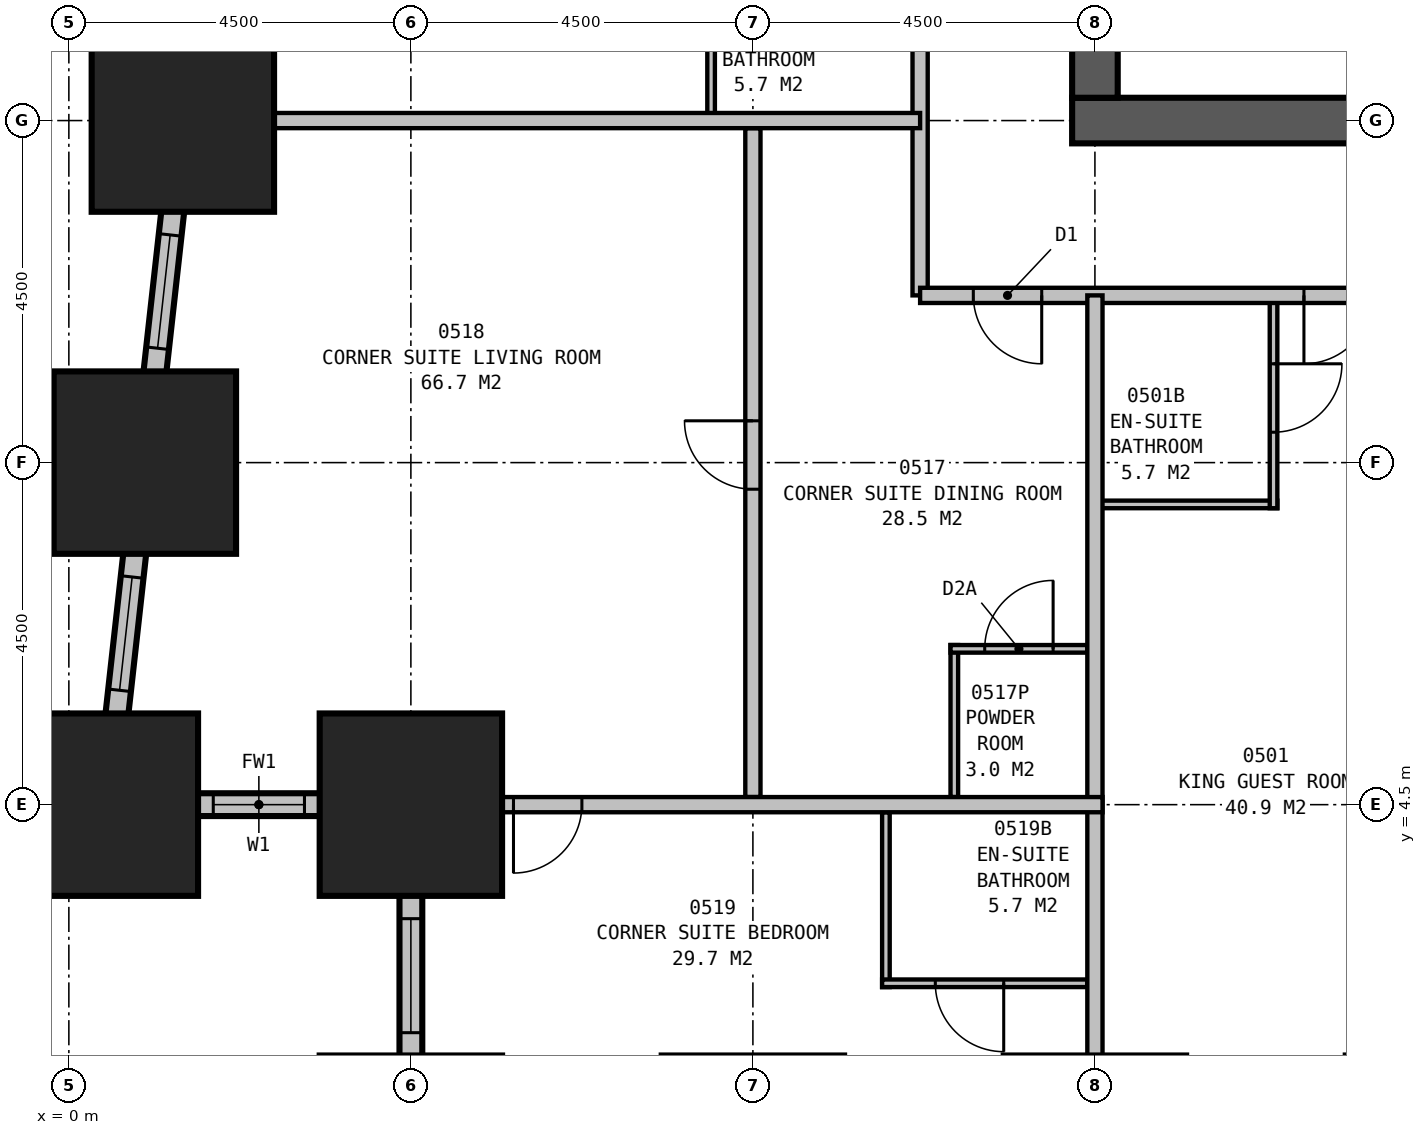
"""IFC4 building model, lengths in metres.
Left out: names, types, materials, properties, quantities, classifications, styles, units other than length and angle.
Written with IfcOpenShell. Run it as: python <this file> out.ifc"""

import sys

from ifc_helpers import new_model, si_unit, direction, frame, frame_2d, origin, origin_2d, place, context, subcontext, project, spatial, rectangle, extrude, element, fill, save


model = new_model("IFC4")
c1 = context("Model", 3, precision=1e-05, world=origin(), true_north=direction((0.0, 1.0)))
c2 = subcontext(c1, "Body", "Model", "MODEL_VIEW")
j1 = project(units=[si_unit("LENGTHUNIT", "METRE"), si_unit("PLANEANGLEUNIT", "RADIAN")], contexts=[c1])
p1 = place(None, origin())
s1 = spatial("IfcSite", under=j1, at=p1, CompositionType="ELEMENT")
p2 = place(p1, origin())
s2 = spatial("IfcBuilding", under=s1, at=p2, CompositionType="ELEMENT")
p3 = place(p2, frame((0.0, 0.0, 29.7)))
s3 = spatial("IfcBuildingStorey", under=s2, at=p3, CompositionType="ELEMENT", Elevation=29.7)
for number, where, z_axis, x_axis in (
    (1, (0.5, 4.5, 0.0), (0.0, 0.0, 1.0), (1.0, 0.0, 0.0)),
    (2, (4.5, 4.5, 0.0), (0.0, 0.0, 1.0), (1.0, 0.0, 0.0)),
    (3, (1.5, 13.5, 0.0), (0.0, 0.0, 1.0), (1.0, 0.0, 0.0)),
    (4, (1.0, 9.0, 0.0), (0.0, 0.0, 1.0), (1.0, 0.0, 0.0)),
):
    element("IfcColumn", number, at=place(p3, frame(where, z_axis=z_axis, x_axis=x_axis)), inside=s3, PredefinedType="COLUMN", context=c2, shape_type="SweptSolid", body=[
        extrude(rectangle(XDim=2.4, YDim=2.4, at=origin_2d()), origin(), (0.0, 0.0, 1.0), 3.5),
    ])
p4 = place(p3, frame((13.2, 13.5, 0.0), z_axis=(0.0, 0.0, 1.0), x_axis=(1.0, 0.0, 0.0)))
e5 = element("IfcWall", 5, at=p4, inside=s3, PredefinedType="SHEAR", context=c2, shape_type="SweptSolid", body=[
    extrude(rectangle(XDim=23.1, YDim=0.6, at=frame_2d((11.55, 0.0))), origin(), (0.0, 0.0, 1.0), 3.5),
])
p5 = place(p3, frame((13.5, 16.5, 0.0), z_axis=(0.0, 0.0, 1.0), x_axis=(0.0, -1.0, 0.0)))
e6 = element("IfcWall", 6, at=p5, inside=s3, PredefinedType="SHEAR", context=c2, shape_type="SweptSolid", body=[
    extrude(rectangle(XDim=2.7, YDim=0.6, at=frame_2d((1.35, 0.0))), origin(), (0.0, 0.0, 1.0), 3.5),
])
p6 = place(p3, frame((0.35, 4.5, 0.0), z_axis=(0.0, 0.0, 1.0), x_axis=(1.0, 0.0, 0.0)))
e7 = element("IfcWall", 7, at=p6, inside=s3, PredefinedType="STANDARD", context=c2, shape_type="SweptSolid", body=[
    extrude(rectangle(XDim=4.3, YDim=0.3, at=frame_2d((2.15, 0.0))), origin(), (0.0, 0.0, 1.0), 2.05),
])
p7 = place(p6, frame((1.55, 0.0, 0.5)))
e8 = element("IfcOpeningElement", 8, at=p7, cuts=e7, PredefinedType="OPENING", context=c2, shape_type="SweptSolid", body=[
    extrude(rectangle(XDim=1.2, YDim=1.4, at=frame_2d((0.6, 0.7))), frame((0.0, 0.16, 0.0), z_axis=(0.0, -1.0, 0.0), x_axis=(1.0, 0.0, 0.0)), (0.0, 0.0, 1.0), 0.32),
])
p8 = place(p3, frame((4.5, 4.65, 0.0), z_axis=(0.0, 0.0, 1.0), x_axis=(0.0, -1.0, 0.0)))
e9 = element("IfcWall", 9, at=p8, inside=s3, PredefinedType="STANDARD", context=c2, shape_type="SweptSolid", body=[
    extrude(rectangle(XDim=4.8, YDim=0.3, at=frame_2d((2.4, 0.0))), origin(), (0.0, 0.0, 1.0), 2.05),
])
p9 = place(p8, frame((1.65, 0.0, 0.5)))
e10 = element("IfcOpeningElement", 10, at=p9, cuts=e9, PredefinedType="OPENING", context=c2, shape_type="SweptSolid", body=[
    extrude(rectangle(XDim=1.5, YDim=1.4, at=frame_2d((0.75, 0.7))), frame((0.0, 0.16, 0.0), z_axis=(0.0, -1.0, 0.0), x_axis=(1.0, 0.0, 0.0)), (0.0, 0.0, 1.0), 0.32),
])
p10 = place(p3, frame((4.017, 36.149, 0.0), z_axis=(0.0, 0.0, 1.0), x_axis=(-0.110433201132, -0.993883548555, 0.0)))
e11 = element("IfcWall", 11, at=p10, inside=s3, PredefinedType="STANDARD", context=c2, shape_type="SweptSolid", body=[
    extrude(rectangle(XDim=31.994, YDim=0.3, at=frame_2d((15.997, 0.0))), origin(), (0.0, 0.0, 1.0), 2.05),
])
p11 = place(p10, frame((1.664, 0.0, 0.5)))
e12 = element("IfcOpeningElement", 12, at=p11, cuts=e11, PredefinedType="OPENING", context=c2, shape_type="SweptSolid", body=[
    extrude(rectangle(XDim=1.5, YDim=1.4, at=frame_2d((0.75, 0.7))), frame((0.0, 0.16, 0.0), z_axis=(0.0, -1.0, 0.0), x_axis=(1.0, 0.0, 0.0)), (0.0, 0.0, 1.0), 0.32),
])
p12 = place(p10, frame((6.192, 0.0, 0.5)))
e13 = element("IfcOpeningElement", 13, at=p12, cuts=e11, PredefinedType="OPENING", context=c2, shape_type="SweptSolid", body=[
    extrude(rectangle(XDim=1.5, YDim=1.4, at=frame_2d((0.75, 0.7))), frame((0.0, 0.16, 0.0), z_axis=(0.0, -1.0, 0.0), x_axis=(1.0, 0.0, 0.0)), (0.0, 0.0, 1.0), 0.32),
])
p13 = place(p10, frame((10.719, 0.0, 0.5)))
e14 = element("IfcOpeningElement", 14, at=p13, cuts=e11, PredefinedType="OPENING", context=c2, shape_type="SweptSolid", body=[
    extrude(rectangle(XDim=1.5, YDim=1.4, at=frame_2d((0.75, 0.7))), frame((0.0, 0.16, 0.0), z_axis=(0.0, -1.0, 0.0), x_axis=(1.0, 0.0, 0.0)), (0.0, 0.0, 1.0), 0.32),
])
p14 = place(p10, frame((15.247, 0.0, 0.5)))
e15 = element("IfcOpeningElement", 15, at=p14, cuts=e11, PredefinedType="OPENING", context=c2, shape_type="SweptSolid", body=[
    extrude(rectangle(XDim=1.5, YDim=1.4, at=frame_2d((0.75, 0.7))), frame((0.0, 0.16, 0.0), z_axis=(0.0, -1.0, 0.0), x_axis=(1.0, 0.0, 0.0)), (0.0, 0.0, 1.0), 0.32),
])
p15 = place(p10, frame((19.775, 0.0, 0.5)))
e16 = element("IfcOpeningElement", 16, at=p15, cuts=e11, PredefinedType="OPENING", context=c2, shape_type="SweptSolid", body=[
    extrude(rectangle(XDim=1.5, YDim=1.4, at=frame_2d((0.75, 0.7))), frame((0.0, 0.16, 0.0), z_axis=(0.0, -1.0, 0.0), x_axis=(1.0, 0.0, 0.0)), (0.0, 0.0, 1.0), 0.32),
])
p16 = place(p10, frame((24.302, 0.0, 0.5)))
e17 = element("IfcOpeningElement", 17, at=p16, cuts=e11, PredefinedType="OPENING", context=c2, shape_type="SweptSolid", body=[
    extrude(rectangle(XDim=1.5, YDim=1.4, at=frame_2d((0.75, 0.7))), frame((0.0, 0.16, 0.0), z_axis=(0.0, -1.0, 0.0), x_axis=(1.0, 0.0, 0.0)), (0.0, 0.0, 1.0), 0.32),
])
p17 = place(p10, frame((28.83, 0.0, 0.5)))
e18 = element("IfcOpeningElement", 18, at=p17, cuts=e11, PredefinedType="OPENING", context=c2, shape_type="SweptSolid", body=[
    extrude(rectangle(XDim=1.5, YDim=1.4, at=frame_2d((0.75, 0.7))), frame((0.0, 0.16, 0.0), z_axis=(0.0, -1.0, 0.0), x_axis=(1.0, 0.0, 0.0)), (0.0, 0.0, 1.0), 0.32),
])
p18 = place(p3, frame((11.2, 11.2, 0.0), z_axis=(0.0, 0.0, 1.0), x_axis=(1.0, 0.0, 0.0)))
e19 = element("IfcWall", 19, at=p18, inside=s3, PredefinedType="PARTITIONING", context=c2, shape_type="SweptSolid", body=[
    extrude(rectangle(XDim=27.1, YDim=0.2, at=frame_2d((13.55, 0.0))), origin(), (0.0, 0.0, 1.0), 3.25),
])
p19 = place(p18, frame((5.95, 0.0, 0.0), z_axis=(0.0, 0.0, 1.0), x_axis=(-1.0, 0.0, 0.0)))
e20 = element("IfcOpeningElement", 20, at=p19, cuts=e19, PredefinedType="OPENING", context=c2, shape_type="SweptSolid", body=[
    extrude(rectangle(XDim=0.9, YDim=2.1, at=frame_2d((0.45, 1.05))), frame((0.0, 0.11, 0.0), z_axis=(0.0, -1.0, 0.0), x_axis=(1.0, 0.0, 0.0)), (0.0, 0.0, 1.0), 0.22),
])
p20 = place(p18, frame((10.95, 0.0, 0.0), z_axis=(0.0, 0.0, 1.0), x_axis=(-1.0, 0.0, 0.0)))
e21 = element("IfcOpeningElement", 21, at=p20, cuts=e19, PredefinedType="OPENING", context=c2, shape_type="SweptSolid", body=[
    extrude(rectangle(XDim=1.0, YDim=2.1, at=frame_2d((0.5, 1.05))), frame((0.0, 0.11, 0.0), z_axis=(0.0, -1.0, 0.0), x_axis=(1.0, 0.0, 0.0)), (0.0, 0.0, 1.0), 0.22),
])
p21 = place(p18, frame((14.95, 0.0, 0.0), z_axis=(0.0, 0.0, 1.0), x_axis=(-1.0, 0.0, 0.0)))
e22 = element("IfcOpeningElement", 22, at=p21, cuts=e19, PredefinedType="OPENING", context=c2, shape_type="SweptSolid", body=[
    extrude(rectangle(XDim=0.9, YDim=2.1, at=frame_2d((0.45, 1.05))), frame((0.0, 0.11, 0.0), z_axis=(0.0, -1.0, 0.0), x_axis=(1.0, 0.0, 0.0)), (0.0, 0.0, 1.0), 0.22),
])
p22 = place(p18, frame((19.45, 0.0, 0.0), z_axis=(0.0, 0.0, 1.0), x_axis=(-1.0, 0.0, 0.0)))
e23 = element("IfcOpeningElement", 23, at=p22, cuts=e19, PredefinedType="OPENING", context=c2, shape_type="SweptSolid", body=[
    extrude(rectangle(XDim=0.9, YDim=2.1, at=frame_2d((0.45, 1.05))), frame((0.0, 0.11, 0.0), z_axis=(0.0, -1.0, 0.0), x_axis=(1.0, 0.0, 0.0)), (0.0, 0.0, 1.0), 0.22),
])
p23 = place(p18, frame((23.95, 0.0, 0.0), z_axis=(0.0, 0.0, 1.0), x_axis=(-1.0, 0.0, 0.0)))
e24 = element("IfcOpeningElement", 24, at=p23, cuts=e19, PredefinedType="OPENING", context=c2, shape_type="SweptSolid", body=[
    extrude(rectangle(XDim=0.9, YDim=2.1, at=frame_2d((0.45, 1.05))), frame((0.0, 0.11, 0.0), z_axis=(0.0, -1.0, 0.0), x_axis=(1.0, 0.0, 0.0)), (0.0, 0.0, 1.0), 0.22),
])
p24 = place(p18, frame((1.6, 0.0, 0.0), z_axis=(0.0, 0.0, 1.0), x_axis=(-1.0, 0.0, 0.0)))
e25 = element("IfcOpeningElement", 25, at=p24, cuts=e19, PredefinedType="OPENING", context=c2, shape_type="SweptSolid", body=[
    extrude(rectangle(XDim=0.9, YDim=2.1, at=frame_2d((0.45, 1.05))), frame((0.0, 0.11, 0.0), z_axis=(0.0, -1.0, 0.0), x_axis=(1.0, 0.0, 0.0)), (0.0, 0.0, 1.0), 0.22),
])
p25 = place(p18, frame((26.4, 0.0, 0.0), z_axis=(0.0, 0.0, 1.0), x_axis=(-1.0, 0.0, 0.0)))
e26 = element("IfcOpeningElement", 26, at=p25, cuts=e19, PredefinedType="OPENING", context=c2, shape_type="SweptSolid", body=[
    extrude(rectangle(XDim=0.9, YDim=2.1, at=frame_2d((0.45, 1.05))), frame((0.0, 0.11, 0.0), z_axis=(0.0, -1.0, 0.0), x_axis=(1.0, 0.0, 0.0)), (0.0, 0.0, 1.0), 0.22),
])
p26 = place(p3, frame((11.2, 11.2, 0.0), z_axis=(0.0, 0.0, 1.0), x_axis=(0.0, 1.0, 0.0)))
e27 = element("IfcWall", 27, at=p26, inside=s3, PredefinedType="PARTITIONING", context=c2, shape_type="SweptSolid", body=[
    extrude(rectangle(XDim=18.1, YDim=0.2, at=frame_2d((9.05, 0.0))), origin(), (0.0, 0.0, 1.0), 3.25),
])
p27 = place(p26, frame((5.05, 0.0, 0.0)))
e28 = element("IfcOpeningElement", 28, at=p27, cuts=e27, PredefinedType="OPENING", context=c2, shape_type="SweptSolid", body=[
    extrude(rectangle(XDim=0.9, YDim=2.1, at=frame_2d((0.45, 1.05))), frame((0.0, 0.11, 0.0), z_axis=(0.0, -1.0, 0.0), x_axis=(1.0, 0.0, 0.0)), (0.0, 0.0, 1.0), 0.22),
])
p28 = place(p26, frame((9.55, 0.0, 0.0)))
e29 = element("IfcOpeningElement", 29, at=p28, cuts=e27, PredefinedType="OPENING", context=c2, shape_type="SweptSolid", body=[
    extrude(rectangle(XDim=0.9, YDim=2.1, at=frame_2d((0.45, 1.05))), frame((0.0, 0.11, 0.0), z_axis=(0.0, -1.0, 0.0), x_axis=(1.0, 0.0, 0.0)), (0.0, 0.0, 1.0), 0.22),
])
p29 = place(p26, frame((12.0, 0.0, 0.0)))
e30 = element("IfcOpeningElement", 30, at=p29, cuts=e27, PredefinedType="OPENING", context=c2, shape_type="SweptSolid", body=[
    extrude(rectangle(XDim=1.0, YDim=2.1, at=frame_2d((0.5, 1.05))), frame((0.0, 0.11, 0.0), z_axis=(0.0, -1.0, 0.0), x_axis=(1.0, 0.0, 0.0)), (0.0, 0.0, 1.0), 0.22),
])
p30 = place(p3, frame((13.5, 8.45, 0.0), z_axis=(0.0, 0.0, 1.0), x_axis=(1.0, 0.0, 0.0)))
e31 = element("IfcWall", 31, at=p30, inside=s3, PredefinedType="PLUMBINGWALL", context=c2, shape_type="SweptSolid", body=[
    extrude(rectangle(XDim=2.4, YDim=0.1, at=frame_2d((1.2, 0.0))), origin(), (0.0, 0.0, 1.0), 3.25),
])
p31 = place(p3, frame((15.85, 11.2, 0.0), z_axis=(0.0, 0.0, 1.0), x_axis=(0.0, -1.0, 0.0)))
e32 = element("IfcWall", 32, at=p31, inside=s3, PredefinedType="PLUMBINGWALL", context=c2, shape_type="SweptSolid", body=[
    extrude(rectangle(XDim=2.8, YDim=0.1, at=frame_2d((1.4, 0.0))), origin(), (0.0, 0.0, 1.0), 3.25),
])
p32 = place(p31, frame((0.9, 0.0, 0.0)))
e33 = element("IfcOpeningElement", 33, at=p32, cuts=e32, PredefinedType="OPENING", context=c2, shape_type="SweptSolid", body=[
    extrude(rectangle(XDim=0.9, YDim=2.1, at=frame_2d((0.45, 1.05))), frame((0.0, 0.06, 0.0), z_axis=(0.0, -1.0, 0.0), x_axis=(1.0, 0.0, 0.0)), (0.0, 0.0, 1.0), 0.12),
])
p33 = place(p3, frame((8.45, 13.5, 0.0), z_axis=(0.0, 0.0, 1.0), x_axis=(0.0, 1.0, 0.0)))
e34 = element("IfcWall", 34, at=p33, inside=s3, PredefinedType="PLUMBINGWALL", context=c2, shape_type="SweptSolid", body=[
    extrude(rectangle(XDim=2.4, YDim=0.1, at=frame_2d((1.2, 0.0))), origin(), (0.0, 0.0, 1.0), 3.25),
])
p34 = place(p3, frame((11.2, 13.5, 0.0), z_axis=(0.0, 0.0, 1.0), x_axis=(-1.0, 0.0, 0.0)))
e35 = element("IfcWall", 35, at=p34, inside=s3, PredefinedType="PARTITIONING", context=c2, shape_type="SweptSolid", body=[
    extrude(rectangle(XDim=9.921, YDim=0.2, at=frame_2d((4.96, 0.0))), origin(), (0.0, 0.0, 1.0), 1.95),
])
p35 = place(p3, frame((13.5, 11.2, 0.0), z_axis=(0.0, 0.0, 1.0), x_axis=(0.0, -1.0, 0.0)))
e36 = element("IfcWall", 36, at=p35, inside=s3, PredefinedType="PARTITIONING", context=c2, shape_type="SweptSolid", body=[
    extrude(rectangle(XDim=11.2, YDim=0.2, at=frame_2d((5.6, 0.0))), origin(), (0.0, 0.0, 1.0), 2.25),
])
p36 = place(p3, frame((13.6, 4.5, 0.0), z_axis=(0.0, 0.0, 1.0), x_axis=(-1.0, 0.0, 0.0)))
e37 = element("IfcWall", 37, at=p36, inside=s3, PredefinedType="PARTITIONING", context=c2, shape_type="SweptSolid", body=[
    extrude(rectangle(XDim=9.1, YDim=0.2, at=frame_2d((4.55, 0.0))), origin(), (0.0, 0.0, 1.0), 3.25),
])
p37 = place(p36, frame((6.85, 0.0, 0.0)))
e38 = element("IfcOpeningElement", 38, at=p37, cuts=e37, PredefinedType="OPENING", context=c2, shape_type="SweptSolid", body=[
    extrude(rectangle(XDim=0.9, YDim=2.1, at=frame_2d((0.45, 1.05))), frame((0.0, 0.11, 0.0), z_axis=(0.0, -1.0, 0.0), x_axis=(1.0, 0.0, 0.0)), (0.0, 0.0, 1.0), 0.22),
])
p38 = place(p3, frame((9.0, 4.6, 0.0), z_axis=(0.0, 0.0, 1.0), x_axis=(0.0, 1.0, 0.0)))
e39 = element("IfcWall", 39, at=p38, inside=s3, PredefinedType="PARTITIONING", context=c2, shape_type="SweptSolid", body=[
    extrude(rectangle(XDim=8.8, YDim=0.2, at=frame_2d((4.4, 0.0))), origin(), (0.0, 0.0, 1.0), 2.25),
])
p39 = place(p38, frame((4.05, 0.0, 0.0)))
e40 = element("IfcOpeningElement", 40, at=p39, cuts=e39, PredefinedType="OPENING", context=c2, shape_type="SweptSolid", body=[
    extrude(rectangle(XDim=0.9, YDim=2.1, at=frame_2d((0.45, 1.05))), frame((0.0, 0.11, 0.0), z_axis=(0.0, -1.0, 0.0), x_axis=(1.0, 0.0, 0.0)), (0.0, 0.0, 1.0), 0.22),
])
p40 = place(p3, frame((11.65, 4.6, 0.0), z_axis=(0.0, 0.0, 1.0), x_axis=(0.0, 1.0, 0.0)))
e41 = element("IfcWall", 41, at=p40, inside=s3, PredefinedType="PLUMBINGWALL", context=c2, shape_type="SweptSolid", body=[
    extrude(rectangle(XDim=2.0, YDim=0.1, at=frame_2d((1.0, 0.0))), origin(), (0.0, 0.0, 1.0), 3.25),
])
p41 = place(p3, frame((13.4, 6.55, 0.0), z_axis=(0.0, 0.0, 1.0), x_axis=(-1.0, 0.0, 0.0)))
e42 = element("IfcWall", 42, at=p41, inside=s3, PredefinedType="PLUMBINGWALL", context=c2, shape_type="SweptSolid", body=[
    extrude(rectangle(XDim=1.8, YDim=0.1, at=frame_2d((0.9, 0.0))), origin(), (0.0, 0.0, 1.0), 3.25),
])
p42 = place(p41, frame((1.35, 0.0, 0.0), z_axis=(0.0, 0.0, 1.0), x_axis=(-1.0, 0.0, 0.0)))
e43 = element("IfcOpeningElement", 43, at=p42, cuts=e42, PredefinedType="OPENING", context=c2, shape_type="SweptSolid", body=[
    extrude(rectangle(XDim=0.9, YDim=2.1, at=frame_2d((0.45, 1.05))), frame((0.0, 0.06, 0.0), z_axis=(0.0, -1.0, 0.0), x_axis=(1.0, 0.0, 0.0)), (0.0, 0.0, 1.0), 0.12),
])
p43 = place(p3, frame((10.75, 4.4, 0.0), z_axis=(0.0, 0.0, 1.0), x_axis=(0.0, -1.0, 0.0)))
e44 = element("IfcWall", 44, at=p43, inside=s3, PredefinedType="PLUMBINGWALL", context=c2, shape_type="SweptSolid", body=[
    extrude(rectangle(XDim=2.3, YDim=0.1, at=frame_2d((1.15, 0.0))), origin(), (0.0, 0.0, 1.0), 3.25),
])
p44 = place(p3, frame((13.4, 2.15, 0.0), z_axis=(0.0, 0.0, 1.0), x_axis=(-1.0, 0.0, 0.0)))
e45 = element("IfcWall", 45, at=p44, inside=s3, PredefinedType="PLUMBINGWALL", context=c2, shape_type="SweptSolid", body=[
    extrude(rectangle(XDim=2.7, YDim=0.1, at=frame_2d((1.35, 0.0))), origin(), (0.0, 0.0, 1.0), 3.25),
])
p45 = place(p44, frame((1.1, 0.0, 0.0)))
e46 = element("IfcOpeningElement", 46, at=p45, cuts=e45, PredefinedType="OPENING", context=c2, shape_type="SweptSolid", body=[
    extrude(rectangle(XDim=0.9, YDim=2.1, at=frame_2d((0.45, 1.05))), frame((0.0, 0.06, 0.0), z_axis=(0.0, -1.0, 0.0), x_axis=(1.0, 0.0, 0.0)), (0.0, 0.0, 1.0), 0.12),
])
p46 = place(p7, origin())
e47 = element("IfcWindow", 47, at=p46, inside=s3, PartitioningType="SINGLE_PANEL", PredefinedType="WINDOW", context=c2, shape_type="SweptSolid", body=[
    extrude(rectangle(XDim=1.2, YDim=1.4, at=frame_2d((0.6, 0.7))), frame((0.0, 0.03, 0.0), z_axis=(0.0, -1.0, 0.0), x_axis=(1.0, 0.0, 0.0)), (0.0, 0.0, 1.0), 0.06),
])
fill(e8, e47)
p47 = place(p9, origin())
e48 = element("IfcWindow", 48, at=p47, inside=s3, PartitioningType="SINGLE_PANEL", PredefinedType="WINDOW", context=c2, shape_type="SweptSolid", body=[
    extrude(rectangle(XDim=1.5, YDim=1.4, at=frame_2d((0.75, 0.7))), frame((0.0, 0.03, 0.0), z_axis=(0.0, -1.0, 0.0), x_axis=(1.0, 0.0, 0.0)), (0.0, 0.0, 1.0), 0.06),
])
fill(e10, e48)
p48 = place(p16, origin())
e49 = element("IfcWindow", 49, at=p48, inside=s3, PartitioningType="SINGLE_PANEL", PredefinedType="WINDOW", context=c2, shape_type="SweptSolid", body=[
    extrude(rectangle(XDim=1.5, YDim=1.4, at=frame_2d((0.75, 0.7))), frame((0.0, 0.03, 0.0), z_axis=(0.0, -1.0, 0.0), x_axis=(1.0, 0.0, 0.0)), (0.0, 0.0, 1.0), 0.06),
])
fill(e17, e49)
p49 = place(p17, origin())
e50 = element("IfcWindow", 50, at=p49, inside=s3, PartitioningType="SINGLE_PANEL", PredefinedType="WINDOW", context=c2, shape_type="SweptSolid", body=[
    extrude(rectangle(XDim=1.5, YDim=1.4, at=frame_2d((0.75, 0.7))), frame((0.0, 0.03, 0.0), z_axis=(0.0, -1.0, 0.0), x_axis=(1.0, 0.0, 0.0)), (0.0, 0.0, 1.0), 0.06),
])
fill(e18, e50)
p50 = place(p19, origin())
e51 = element("IfcDoor", 51, at=p50, inside=s3, OperationType="SINGLE_SWING_RIGHT", PredefinedType="DOOR", context=c2, shape_type="SweptSolid", body=[
    extrude(rectangle(XDim=0.9, YDim=2.1, at=frame_2d((0.45, 1.05))), frame((0.0, 0.025, 0.0), z_axis=(0.0, -1.0, 0.0), x_axis=(1.0, 0.0, 0.0)), (0.0, 0.0, 1.0), 0.05),
])
fill(e20, e51)
p51 = place(p24, origin())
e52 = element("IfcDoor", 52, at=p51, inside=s3, OperationType="SINGLE_SWING_LEFT", PredefinedType="DOOR", context=c2, shape_type="SweptSolid", body=[
    extrude(rectangle(XDim=0.9, YDim=2.1, at=frame_2d((0.45, 1.05))), frame((0.0, 0.025, 0.0), z_axis=(0.0, -1.0, 0.0), x_axis=(1.0, 0.0, 0.0)), (0.0, 0.0, 1.0), 0.05),
])
fill(e25, e52)
p52 = place(p32, origin())
e53 = element("IfcDoor", 53, at=p52, inside=s3, OperationType="SINGLE_SWING_LEFT", PredefinedType="DOOR", context=c2, shape_type="SweptSolid", body=[
    extrude(rectangle(XDim=0.9, YDim=2.1, at=frame_2d((0.45, 1.05))), frame((0.0, 0.025, 0.0), z_axis=(0.0, -1.0, 0.0), x_axis=(1.0, 0.0, 0.0)), (0.0, 0.0, 1.0), 0.05),
])
fill(e33, e53)
p53 = place(p37, origin())
e54 = element("IfcDoor", 54, at=p53, inside=s3, OperationType="SINGLE_SWING_RIGHT", PredefinedType="DOOR", context=c2, shape_type="SweptSolid", body=[
    extrude(rectangle(XDim=0.9, YDim=2.1, at=frame_2d((0.45, 1.05))), frame((0.0, 0.025, 0.0), z_axis=(0.0, -1.0, 0.0), x_axis=(1.0, 0.0, 0.0)), (0.0, 0.0, 1.0), 0.05),
])
fill(e38, e54)
p54 = place(p39, origin())
e55 = element("IfcDoor", 55, at=p54, inside=s3, OperationType="SINGLE_SWING_RIGHT", PredefinedType="DOOR", context=c2, shape_type="SweptSolid", body=[
    extrude(rectangle(XDim=0.9, YDim=2.1, at=frame_2d((0.45, 1.05))), frame((0.0, 0.025, 0.0), z_axis=(0.0, -1.0, 0.0), x_axis=(1.0, 0.0, 0.0)), (0.0, 0.0, 1.0), 0.05),
])
fill(e40, e55)
p55 = place(p42, origin())
e56 = element("IfcDoor", 56, at=p55, inside=s3, OperationType="SINGLE_SWING_RIGHT", PredefinedType="DOOR", context=c2, shape_type="SweptSolid", body=[
    extrude(rectangle(XDim=0.9, YDim=2.1, at=frame_2d((0.45, 1.05))), frame((0.0, 0.025, 0.0), z_axis=(0.0, -1.0, 0.0), x_axis=(1.0, 0.0, 0.0)), (0.0, 0.0, 1.0), 0.05),
])
fill(e43, e56)
p56 = place(p45, origin())
e57 = element("IfcDoor", 57, at=p56, inside=s3, OperationType="SINGLE_SWING_LEFT", PredefinedType="DOOR", context=c2, shape_type="SweptSolid", body=[
    extrude(rectangle(XDim=0.9, YDim=2.1, at=frame_2d((0.45, 1.05))), frame((0.0, 0.025, 0.0), z_axis=(0.0, -1.0, 0.0), x_axis=(1.0, 0.0, 0.0)), (0.0, 0.0, 1.0), 0.05),
])
fill(e46, e57)
save(model, sys.argv[1])
